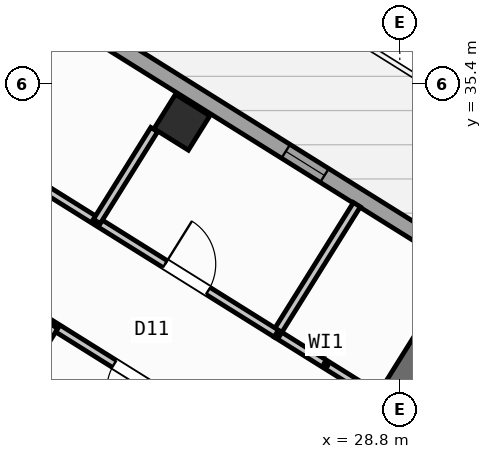
"""IFC4 building model, lengths in metres.
Left out: names, types, materials, properties, quantities, classifications, styles, units other than length and angle.
Written with IfcOpenShell. Run it as: python <this file> out.ifc"""

import sys

from ifc_helpers import new_model, si_unit, direction, frame, frame_2d, origin, origin_2d, place, context, subcontext, project, spatial, rectangle, hollow_rectangle, extrude, source, transform, mapped, element, fill, save


model = new_model("IFC4")
c1 = context("Model", 3, precision=1e-05, world=origin(), true_north=direction((0.0, 1.0)))
c2 = subcontext(c1, "Body", "Model", "MODEL_VIEW")
j1 = project(units=[si_unit("LENGTHUNIT", "METRE"), si_unit("PLANEANGLEUNIT", "RADIAN")], contexts=[c1])
p1 = place(None, origin())
s1 = spatial("IfcSite", under=j1, at=p1, CompositionType="ELEMENT")
p2 = place(p1, origin())
s2 = spatial("IfcBuilding", under=s1, at=p2, CompositionType="ELEMENT")
p3 = place(p2, frame((0.0, 0.0, 174.9)))
s3 = spatial("IfcBuildingStorey", under=s2, at=p3, CompositionType="ELEMENT", Elevation=174.9)
p4 = place(p3, frame((29.517, 30.594, 0.0), z_axis=(0.0, 0.0, 1.0), x_axis=(-0.529906864564, -0.848055844204, 0.0)))
e1 = element("IfcWall", 1, at=p4, inside=s3, PredefinedType="SHEAR", context=c2, shape_type="SweptSolid", body=[
    extrude(rectangle(XDim=3.575, YDim=0.55, at=frame_2d((1.788, 0.0))), origin(), (0.0, 0.0, 1.0), 4.22),
])
m1 = source(origin(), c2, "Body", "SweptSolid", [
    extrude(hollow_rectangle(XDim=0.8, YDim=0.8, WallThickness=0.032, at=origin_2d()), origin(), (0.0, 0.0, 1.0), 4.5),
])
p5 = place(p3, frame((24.5, 34.643, 0.0), z_axis=(0.0, 0.0, 1.0), x_axis=(-0.848048096156, 0.529919264233, 0.0)))
e2 = element("IfcColumn", 2, at=p5, inside=s3, PredefinedType="COLUMN", context=c2, shape_type="MappedRepresentation", body=[
    mapped(m1, transform((0.0, 0.0, 0.0), scale=1.0)),
])
p6 = place(p3, frame((14.138, 41.825, 0.0), z_axis=(0.0, 0.0, 1.0), x_axis=(0.848046498049, -0.529921821731, 0.0)))
e3 = element("IfcWall", 3, at=p6, inside=s3, PredefinedType="STANDARD", context=c2, shape_type="SweptSolid", body=[
    extrude(rectangle(XDim=31.588, YDim=0.32, at=frame_2d((15.794, 0.0))), origin(), (0.0, 0.0, 1.0), 4.22),
])
p7 = place(p6, frame((3.339, 0.0, 0.0)))
e4 = element("IfcOpeningElement", 4, at=p7, cuts=e3, PredefinedType="OPENING", context=c2, shape_type="SweptSolid", body=[
    extrude(rectangle(XDim=1.05, YDim=2.15, at=frame_2d((0.525, 1.075))), frame((0.0, 0.17, 0.0), z_axis=(0.0, -1.0, 0.0), x_axis=(1.0, 0.0, 0.0)), (0.0, 0.0, 1.0), 0.34),
])
p8 = place(p6, frame((1.819, 0.0, 1.0)))
e5 = element("IfcOpeningElement", 5, at=p8, cuts=e3, PredefinedType="OPENING", context=c2, shape_type="SweptSolid", body=[
    extrude(rectangle(XDim=0.9, YDim=1.25, at=frame_2d((0.45, 0.625))), frame((0.0, 0.17, 0.0), z_axis=(0.0, -1.0, 0.0), x_axis=(1.0, 0.0, 0.0)), (0.0, 0.0, 1.0), 0.34),
])
p9 = place(p6, frame((8.494, 0.0, 0.85)))
e6 = element("IfcOpeningElement", 6, at=p9, cuts=e3, PredefinedType="OPENING", context=c2, shape_type="SweptSolid", body=[
    extrude(rectangle(XDim=1.8, YDim=1.5, at=frame_2d((0.9, 0.75))), frame((0.0, 0.17, 0.0), z_axis=(0.0, -1.0, 0.0), x_axis=(1.0, 0.0, 0.0)), (0.0, 0.0, 1.0), 0.34),
])
p10 = place(p6, frame((14.636, 0.0, 1.0)))
e7 = element("IfcOpeningElement", 7, at=p10, cuts=e3, PredefinedType="OPENING", context=c2, shape_type="SweptSolid", body=[
    extrude(rectangle(XDim=0.9, YDim=1.25, at=frame_2d((0.45, 0.625))), frame((0.0, 0.17, 0.0), z_axis=(0.0, -1.0, 0.0), x_axis=(1.0, 0.0, 0.0)), (0.0, 0.0, 1.0), 0.34),
])
p11 = place(p6, frame((22.456, 0.0, 0.95)))
e8 = element("IfcOpeningElement", 8, at=p11, cuts=e3, PredefinedType="OPENING", context=c2, shape_type="SweptSolid", body=[
    extrude(rectangle(XDim=1.2, YDim=1.4, at=frame_2d((0.6, 0.7))), frame((0.0, 0.17, 0.0), z_axis=(0.0, -1.0, 0.0), x_axis=(1.0, 0.0, 0.0)), (0.0, 0.0, 1.0), 0.34),
])
p12 = place(p6, frame((27.131, 0.0, 0.95)))
e9 = element("IfcOpeningElement", 9, at=p12, cuts=e3, PredefinedType="OPENING", context=c2, shape_type="SweptSolid", body=[
    extrude(rectangle(XDim=1.2, YDim=1.4, at=frame_2d((0.6, 0.7))), frame((0.0, 0.17, 0.0), z_axis=(0.0, -1.0, 0.0), x_axis=(1.0, 0.0, 0.0)), (0.0, 0.0, 1.0), 0.34),
])
p13 = place(p3, frame((28.321, 29.249, 0.0), z_axis=(0.0, 0.0, 1.0), x_axis=(-0.848028015797, 0.529951398172, 0.0)))
e10 = element("IfcWall", 10, at=p13, inside=s3, PredefinedType="PARTITIONING", context=c2, shape_type="SweptSolid", body=[
    extrude(rectangle(XDim=2.308, YDim=0.16, at=frame_2d((1.154, 0.0))), origin(), (0.0, 0.0, 1.0), 4.21),
])
p14 = place(p3, frame((27.953, 33.016, 0.0), z_axis=(0.0, 0.0, 1.0), x_axis=(-0.529874576144, -0.848076018737, 0.0)))
e11 = element("IfcWall", 11, at=p14, inside=s3, PredefinedType="PARTITIONING", context=c2, shape_type="SweptSolid", body=[
    extrude(rectangle(XDim=3.0, YDim=0.16, at=frame_2d((1.5, 0.0))), origin(), (0.0, 0.0, 1.0), 4.21),
])
p15 = place(p3, frame((26.363, 30.472, 0.0), z_axis=(0.0, 0.0, 1.0), x_axis=(-0.848052408131, 0.529912363569, 0.0)))
e12 = element("IfcWall", 12, at=p15, inside=s3, PredefinedType="PARTITIONING", context=c2, shape_type="SweptSolid", body=[
    extrude(rectangle(XDim=16.73, YDim=0.16, at=frame_2d((8.365, 0.0))), origin(), (0.0, 0.0, 1.0), 4.21),
])
p16 = place(p15, frame((1.588, 0.0, 0.0)))
e13 = element("IfcOpeningElement", 13, at=p16, cuts=e12, PredefinedType="OPENING", context=c2, shape_type="SweptSolid", body=[
    extrude(rectangle(XDim=1.0, YDim=2.1, at=frame_2d((0.5, 1.05))), frame((0.0, 0.09, 0.0), z_axis=(0.0, -1.0, 0.0), x_axis=(1.0, 0.0, 0.0)), (0.0, 0.0, 1.0), 0.18),
])
p17 = place(p15, frame((6.685, 0.0, 0.0)))
e14 = element("IfcOpeningElement", 14, at=p17, cuts=e12, PredefinedType="OPENING", context=c2, shape_type="SweptSolid", body=[
    extrude(rectangle(XDim=1.0, YDim=2.1, at=frame_2d((0.5, 1.05))), frame((0.0, 0.09, 0.0), z_axis=(0.0, -1.0, 0.0), x_axis=(1.0, 0.0, 0.0)), (0.0, 0.0, 1.0), 0.18),
])
p18 = place(p15, frame((12.951, 0.0, 0.0)))
e15 = element("IfcOpeningElement", 15, at=p18, cuts=e12, PredefinedType="OPENING", context=c2, shape_type="SweptSolid", body=[
    extrude(rectangle(XDim=1.0, YDim=2.1, at=frame_2d((0.5, 1.05))), frame((0.0, 0.09, 0.0), z_axis=(0.0, -1.0, 0.0), x_axis=(1.0, 0.0, 0.0)), (0.0, 0.0, 1.0), 0.18),
])
p19 = place(p3, frame((25.198, 28.606, 0.0), z_axis=(0.0, 0.0, 1.0), x_axis=(-0.848052408131, 0.529912363569, 0.0)))
e16 = element("IfcWall", 16, at=p19, inside=s3, PredefinedType="PARTITIONING", context=c2, shape_type="SweptSolid", body=[
    extrude(rectangle(XDim=16.73, YDim=0.16, at=frame_2d((8.365, 0.0))), origin(), (0.0, 0.0, 1.0), 4.21),
])
p20 = place(p19, frame((1.395, 0.0, 0.0)))
e17 = element("IfcOpeningElement", 17, at=p20, cuts=e16, PredefinedType="OPENING", context=c2, shape_type="SweptSolid", body=[
    extrude(rectangle(XDim=1.0, YDim=2.1, at=frame_2d((0.5, 1.05))), frame((0.0, 0.09, 0.0), z_axis=(0.0, -1.0, 0.0), x_axis=(1.0, 0.0, 0.0)), (0.0, 0.0, 1.0), 0.18),
])
p21 = place(p19, frame((7.82, 0.0, 0.0)))
e18 = element("IfcOpeningElement", 18, at=p21, cuts=e16, PredefinedType="OPENING", context=c2, shape_type="SweptSolid", body=[
    extrude(rectangle(XDim=1.0, YDim=2.1, at=frame_2d((0.5, 1.05))), frame((0.0, 0.09, 0.0), z_axis=(0.0, -1.0, 0.0), x_axis=(1.0, 0.0, 0.0)), (0.0, 0.0, 1.0), 0.18),
])
p22 = place(p19, frame((14.76, 0.0, 0.0)))
e19 = element("IfcOpeningElement", 19, at=p22, cuts=e16, PredefinedType="OPENING", context=c2, shape_type="SweptSolid", body=[
    extrude(rectangle(XDim=1.0, YDim=2.1, at=frame_2d((0.5, 1.05))), frame((0.0, 0.09, 0.0), z_axis=(0.0, -1.0, 0.0), x_axis=(1.0, 0.0, 0.0)), (0.0, 0.0, 1.0), 0.18),
])
for number, where, z_axis, x_axis in (
    (20, (21.983, 30.615, 0.0), (0.0, 0.0, 1.0), (-0.53, -0.848, 0.0)),
    (21, (23.954, 34.499, 0.0), (0.0, 0.0, 1.0), (-0.53, -0.848, 0.0)),
):
    element("IfcWall", number, at=place(p3, frame(where, z_axis=z_axis, x_axis=x_axis)), inside=s3, PredefinedType="PARTITIONING", context=c2, shape_type="SweptSolid", body=[
        extrude(rectangle(XDim=2.138, YDim=0.16, at=frame_2d((1.069, 0.0))), origin(), (0.0, 0.0, 1.0), 2.395),
    ])
m2 = source(origin(), c2, "Body", "SweptSolid", [
    extrude(rectangle(XDim=0.9, YDim=1.25, at=frame_2d((0.45, 0.625))), frame((0.0, 0.03, 0.0), z_axis=(0.0, -1.0, 0.0), x_axis=(1.0, 0.0, 0.0)), (0.0, 0.0, 1.0), 0.06),
])
p23 = place(p10, origin())
e22 = element("IfcWindow", 22, at=p23, inside=s3, PartitioningType="SINGLE_PANEL", PredefinedType="WINDOW", context=c2, shape_type="MappedRepresentation", body=[
    mapped(m2, transform((0.0, 0.0, 0.0), scale=1.0)),
])
fill(e7, e22)
m3 = source(origin(), c2, "Body", "SweptSolid", [
    extrude(rectangle(XDim=1.0, YDim=2.1, at=frame_2d((0.5, 1.05))), frame((0.0, 0.025, 0.0), z_axis=(0.0, -1.0, 0.0), x_axis=(1.0, 0.0, 0.0)), (0.0, 0.0, 1.0), 0.05),
])
p24 = place(p20, origin())
e23 = element("IfcDoor", 23, at=p24, inside=s3, OperationType="SINGLE_SWING_LEFT", PredefinedType="DOOR", context=c2, shape_type="MappedRepresentation", body=[
    mapped(m3, transform((0.0, 0.0, 0.0), scale=1.0)),
])
fill(e17, e23)
p25 = place(p16, frame((1.0, 0.0, 0.0), z_axis=(0.0, 0.0, 1.0), x_axis=(-1.0, 0.0, 0.0)))
e24 = element("IfcDoor", 24, at=p25, inside=s3, OperationType="SINGLE_SWING_LEFT", PredefinedType="DOOR", context=c2, shape_type="MappedRepresentation", body=[
    mapped(m3, transform((0.0, 0.0, 0.0), scale=1.0)),
])
fill(e13, e24)
save(model, sys.argv[1])
